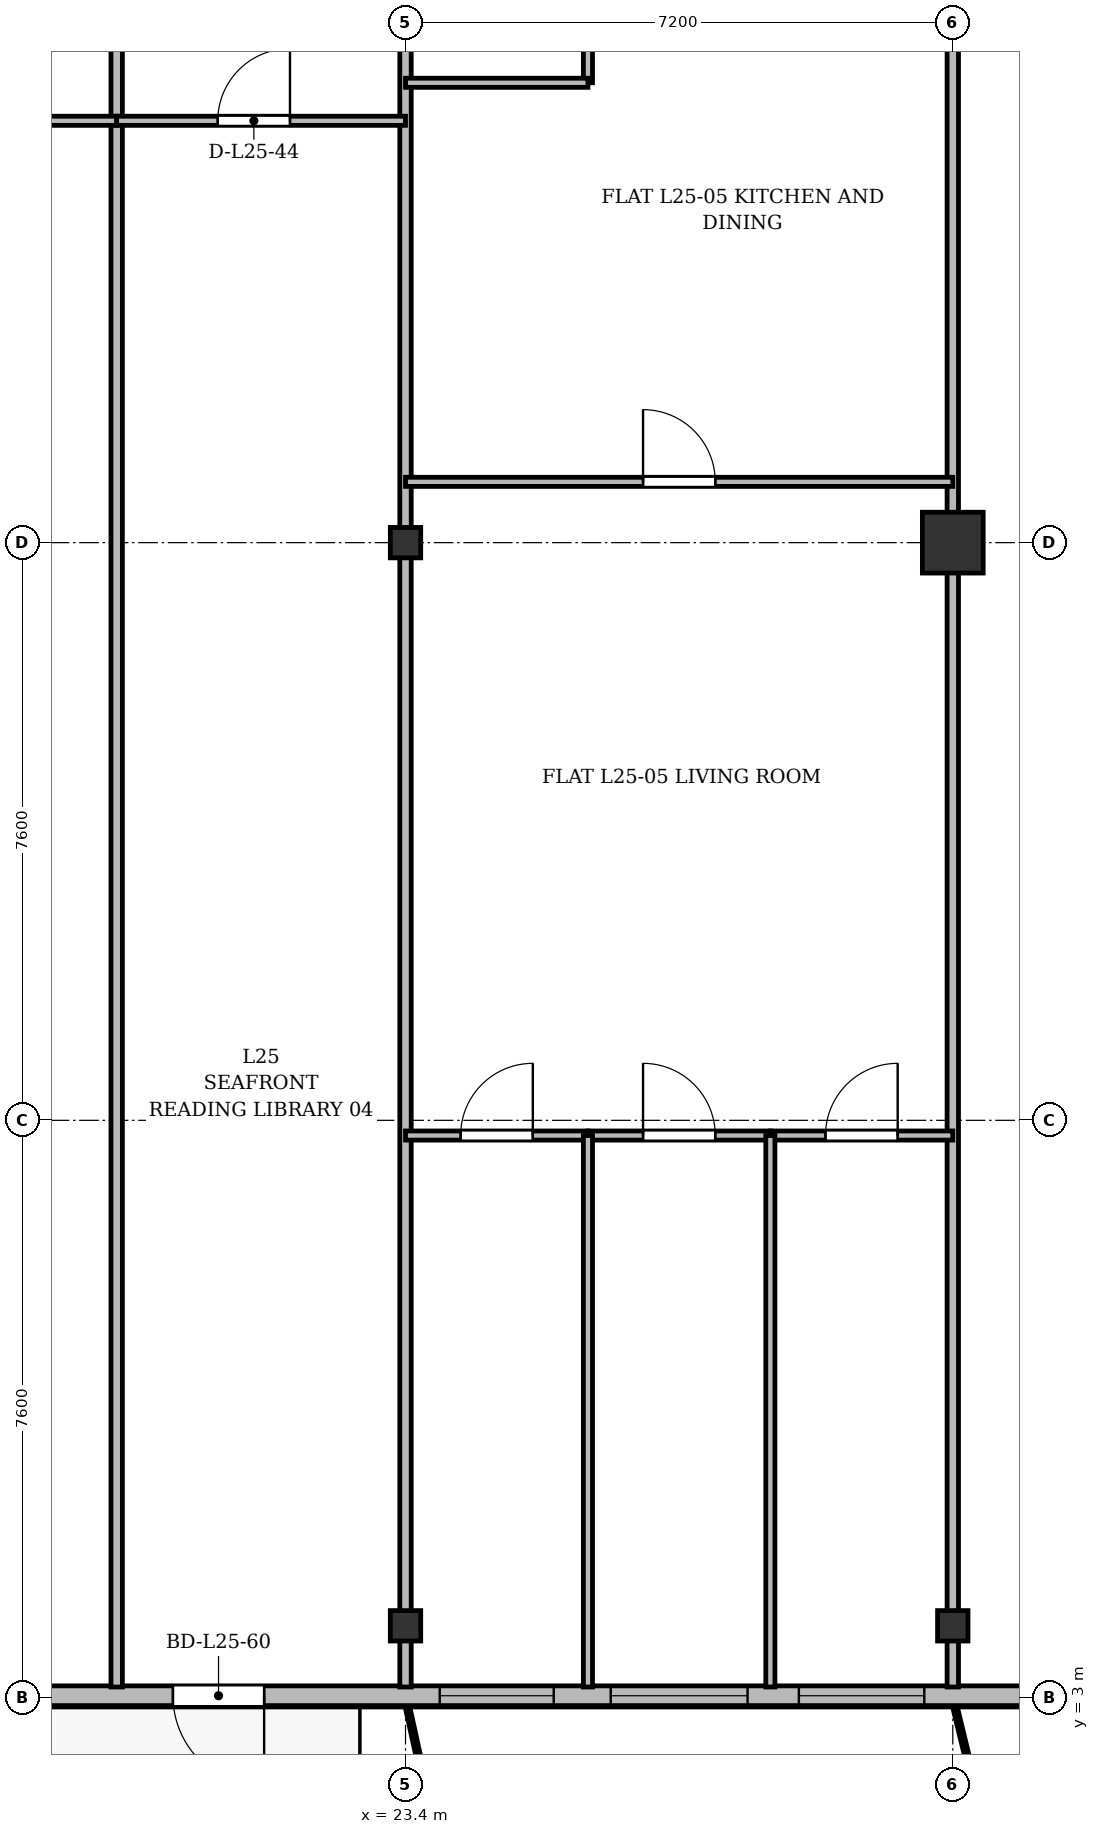
"""IFC4 building model, lengths in metres.
Left out: names, types, materials, properties, quantities, classifications, styles, units other than length and angle.
Written with IfcOpenShell. Run it as: python <this file> out.ifc"""

import sys

from ifc_helpers import new_model, si_unit, direction, frame, frame_2d, origin, origin_2d, place, context, subcontext, project, spatial, rectangle, i_section, extrude, source, transform, mapped, element, fill, save


model = new_model("IFC4")
c1 = context("Model", 3, precision=1e-05, world=origin(), true_north=direction((0.0, 1.0)))
c2 = subcontext(c1, "Body", "Model", "MODEL_VIEW")
j1 = project(units=[si_unit("LENGTHUNIT", "METRE"), si_unit("PLANEANGLEUNIT", "RADIAN")], contexts=[c1])
p1 = place(None, origin())
s1 = spatial("IfcSite", under=j1, at=p1, CompositionType="ELEMENT")
p2 = place(p1, origin())
s2 = spatial("IfcBuilding", under=s1, at=p2, CompositionType="ELEMENT")
p3 = place(p2, frame((0.0, 0.0, 99.7)))
s3 = spatial("IfcBuildingStorey", under=s2, at=p3, CompositionType="ELEMENT", Elevation=99.7)
m1 = source(origin(), c2, "Body", "SweptSolid", [
    extrude(i_section(OverallWidth=0.4, OverallDepth=0.4, WebThickness=0.022, FlangeThickness=0.035, at=origin_2d()), origin(), (0.0, 0.0, 1.0), 3.6),
])
for number, where, z_axis, x_axis in (
    (1, (23.4, 3.95, 0.0), (0.0, 0.0, 1.0), (1.0, 0.0, 0.0)),
    (2, (23.4, 18.2, 0.0), (0.0, 0.0, 1.0), (1.0, 0.0, 0.0)),
    (3, (30.6, 3.95, 0.0), (0.0, 0.0, 1.0), (1.0, 0.0, 0.0)),
):
    element("IfcColumn", number, at=place(p3, frame(where, z_axis=z_axis, x_axis=x_axis)), inside=s3, PredefinedType="COLUMN", context=c2, shape_type="MappedRepresentation", body=[
        mapped(m1, transform((0.0, 0.0, 0.0), x_axis=(1.0, 0.0, 0.0), y_axis=(0.0, 1.0, 0.0), z_axis=(0.0, 0.0, 1.0), scale=1.0)),
    ])
m2 = source(origin(), c2, "Body", "SweptSolid", [
    extrude(rectangle(XDim=0.8, YDim=0.8, at=origin_2d()), origin(), (0.0, 0.0, 1.0), 3.6),
])
p4 = place(p3, frame((30.6, 18.2, 0.0), z_axis=(0.0, 0.0, 1.0), x_axis=(1.0, 0.0, 0.0)))
e4 = element("IfcColumn", 4, at=p4, inside=s3, PredefinedType="COLUMN", context=c2, shape_type="MappedRepresentation", body=[
    mapped(m2, transform((0.0, 0.0, 0.0), x_axis=(1.0, 0.0, 0.0), y_axis=(0.0, 1.0, 0.0), z_axis=(0.0, 0.0, 1.0), scale=1.0)),
])
p5 = place(p3, frame((66.9, 3.03, 0.0), z_axis=(0.0, 0.0, 1.0), x_axis=(-1.0, 0.0, 0.0)))
e5 = element("IfcWall", 5, at=p5, inside=s3, PredefinedType="SOLIDWALL", context=c2, shape_type="SweptSolid", body=[
    extrude(rectangle(XDim=59.4, YDim=0.26, at=frame_2d((29.7, 0.0))), origin(), (0.0, 0.0, 1.0), 3.34),
])
p6 = place(p5, frame((1.9, 0.0, 0.9)))
e6 = element("IfcOpeningElement", 6, at=p6, cuts=e5, PredefinedType="OPENING", context=c2, shape_type="SweptSolid", body=[
    extrude(rectangle(XDim=2.2, YDim=1.8, at=frame_2d((1.1, 0.9))), frame((0.0, 0.14, 0.0), z_axis=(0.0, -1.0, 0.0), x_axis=(1.0, 0.0, 0.0)), (0.0, 0.0, 1.0), 0.28),
])
p7 = place(p5, frame((5.65, 0.0, 0.9)))
e7 = element("IfcOpeningElement", 7, at=p7, cuts=e5, PredefinedType="OPENING", context=c2, shape_type="SweptSolid", body=[
    extrude(rectangle(XDim=1.5, YDim=1.75, at=frame_2d((0.75, 0.875))), frame((0.0, 0.14, 0.0), z_axis=(0.0, -1.0, 0.0), x_axis=(1.0, 0.0, 0.0)), (0.0, 0.0, 1.0), 0.28),
])
p8 = place(p5, frame((8.4, 0.0, 0.9)))
e8 = element("IfcOpeningElement", 8, at=p8, cuts=e5, PredefinedType="OPENING", context=c2, shape_type="SweptSolid", body=[
    extrude(rectangle(XDim=2.0, YDim=1.95, at=frame_2d((1.0, 0.975))), frame((0.0, 0.14, 0.0), z_axis=(0.0, -1.0, 0.0), x_axis=(1.0, 0.0, 0.0)), (0.0, 0.0, 1.0), 0.28),
])
p9 = place(p5, frame((11.175, 0.0, 0.9)))
e9 = element("IfcOpeningElement", 9, at=p9, cuts=e5, PredefinedType="OPENING", context=c2, shape_type="SweptSolid", body=[
    extrude(rectangle(XDim=1.65, YDim=1.85, at=frame_2d((0.825, 0.925))), frame((0.0, 0.14, 0.0), z_axis=(0.0, -1.0, 0.0), x_axis=(1.0, 0.0, 0.0)), (0.0, 0.0, 1.0), 0.28),
])
p10 = place(p5, frame((13.7, 0.0, 0.9)))
e10 = element("IfcOpeningElement", 10, at=p10, cuts=e5, PredefinedType="OPENING", context=c2, shape_type="SweptSolid", body=[
    extrude(rectangle(XDim=1.8, YDim=1.8, at=frame_2d((0.9, 0.9))), frame((0.0, 0.14, 0.0), z_axis=(0.0, -1.0, 0.0), x_axis=(1.0, 0.0, 0.0)), (0.0, 0.0, 1.0), 0.28),
])
p11 = place(p5, frame((16.5, 0.0, 0.9)))
e11 = element("IfcOpeningElement", 11, at=p11, cuts=e5, PredefinedType="OPENING", context=c2, shape_type="SweptSolid", body=[
    extrude(rectangle(XDim=2.2, YDim=1.8, at=frame_2d((1.1, 0.9))), frame((0.0, 0.14, 0.0), z_axis=(0.0, -1.0, 0.0), x_axis=(1.0, 0.0, 0.0)), (0.0, 0.0, 1.0), 0.28),
])
p12 = place(p5, frame((20.227, 0.0, 0.0)))
e12 = element("IfcOpeningElement", 12, at=p12, cuts=e5, PredefinedType="OPENING", context=c2, shape_type="SweptSolid", body=[
    extrude(rectangle(XDim=1.2, YDim=2.2, at=frame_2d((0.6, 1.1))), frame((0.0, 0.14, 0.0), z_axis=(0.0, -1.0, 0.0), x_axis=(1.0, 0.0, 0.0)), (0.0, 0.0, 1.0), 0.28),
])
p13 = place(p5, frame((28.7, 0.0, 0.9)))
e13 = element("IfcOpeningElement", 13, at=p13, cuts=e5, PredefinedType="OPENING", context=c2, shape_type="SweptSolid", body=[
    extrude(rectangle(XDim=2.0, YDim=1.95, at=frame_2d((1.0, 0.975))), frame((0.0, 0.14, 0.0), z_axis=(0.0, -1.0, 0.0), x_axis=(1.0, 0.0, 0.0)), (0.0, 0.0, 1.0), 0.28),
])
p14 = place(p5, frame((36.675, 0.0, 0.9)))
e14 = element("IfcOpeningElement", 14, at=p14, cuts=e5, PredefinedType="OPENING", context=c2, shape_type="SweptSolid", body=[
    extrude(rectangle(XDim=1.65, YDim=1.85, at=frame_2d((0.825, 0.925))), frame((0.0, 0.14, 0.0), z_axis=(0.0, -1.0, 0.0), x_axis=(1.0, 0.0, 0.0)), (0.0, 0.0, 1.0), 0.28),
])
p15 = place(p5, frame((39.0, 0.0, 0.9)))
e15 = element("IfcOpeningElement", 15, at=p15, cuts=e5, PredefinedType="OPENING", context=c2, shape_type="SweptSolid", body=[
    extrude(rectangle(XDim=1.8, YDim=1.8, at=frame_2d((0.9, 0.9))), frame((0.0, 0.14, 0.0), z_axis=(0.0, -1.0, 0.0), x_axis=(1.0, 0.0, 0.0)), (0.0, 0.0, 1.0), 0.28),
])
p16 = place(p5, frame((41.55, 0.0, 0.9)))
e16 = element("IfcOpeningElement", 16, at=p16, cuts=e5, PredefinedType="OPENING", context=c2, shape_type="SweptSolid", body=[
    extrude(rectangle(XDim=1.5, YDim=1.75, at=frame_2d((0.75, 0.875))), frame((0.0, 0.14, 0.0), z_axis=(0.0, -1.0, 0.0), x_axis=(1.0, 0.0, 0.0)), (0.0, 0.0, 1.0), 0.28),
])
p17 = place(p5, frame((45.36, 0.0, 0.0)))
e17 = element("IfcOpeningElement", 17, at=p17, cuts=e5, PredefinedType="OPENING", context=c2, shape_type="SweptSolid", body=[
    extrude(rectangle(XDim=1.2, YDim=2.2, at=frame_2d((0.6, 1.1))), frame((0.0, 0.14, 0.0), z_axis=(0.0, -1.0, 0.0), x_axis=(1.0, 0.0, 0.0)), (0.0, 0.0, 1.0), 0.28),
])
p18 = place(p5, frame((48.3, 0.0, 0.9)))
e18 = element("IfcOpeningElement", 18, at=p18, cuts=e5, PredefinedType="OPENING", context=c2, shape_type="SweptSolid", body=[
    extrude(rectangle(XDim=2.0, YDim=1.95, at=frame_2d((1.0, 0.975))), frame((0.0, 0.14, 0.0), z_axis=(0.0, -1.0, 0.0), x_axis=(1.0, 0.0, 0.0)), (0.0, 0.0, 1.0), 0.28),
])
p19 = place(p5, frame((52.175, 0.0, 0.9)))
e19 = element("IfcOpeningElement", 19, at=p19, cuts=e5, PredefinedType="OPENING", context=c2, shape_type="SweptSolid", body=[
    extrude(rectangle(XDim=1.65, YDim=1.85, at=frame_2d((0.825, 0.925))), frame((0.0, 0.14, 0.0), z_axis=(0.0, -1.0, 0.0), x_axis=(1.0, 0.0, 0.0)), (0.0, 0.0, 1.0), 0.28),
])
p20 = place(p5, frame((55.5, 0.0, 0.9)))
e20 = element("IfcOpeningElement", 20, at=p20, cuts=e5, PredefinedType="OPENING", context=c2, shape_type="SweptSolid", body=[
    extrude(rectangle(XDim=1.8, YDim=1.8, at=frame_2d((0.9, 0.9))), frame((0.0, 0.14, 0.0), z_axis=(0.0, -1.0, 0.0), x_axis=(1.0, 0.0, 0.0)), (0.0, 0.0, 1.0), 0.28),
])
p21 = place(p3, frame((19.6, 3.145, 0.0), z_axis=(0.0, 0.0, 1.0), x_axis=(0.0, 1.0, 0.0)))
e21 = element("IfcWall", 21, at=p21, inside=s3, PredefinedType="PARTITIONING", context=c2, shape_type="SweptSolid", body=[
    extrude(rectangle(XDim=24.455, YDim=0.15, at=frame_2d((12.228, 0.0))), origin(), (0.0, 0.0, 1.0), 2.752),
])
for number, where, z_axis, x_axis in (
    (22, (23.4, 3.145, 0.0), (0.0, 0.0, 1.0), (0.0, 1.0, 0.0)),
    (23, (30.6, 3.145, 0.0), (0.0, 0.0, 1.0), (0.0, 1.0, 0.0)),
):
    element("IfcWall", number, at=place(p3, frame(where, z_axis=z_axis, x_axis=x_axis)), inside=s3, PredefinedType="PARTITIONING", context=c2, shape_type="SweptSolid", body=[
        extrude(rectangle(XDim=24.455, YDim=0.15, at=frame_2d((12.228, 0.0))), origin(), (0.0, 0.0, 1.0), 2.84),
    ])
p22 = place(p3, frame((15.6, 23.75, 0.0), z_axis=(0.0, 0.0, 1.0), x_axis=(1.0, 0.0, 0.0)))
e24 = element("IfcWall", 24, at=p22, inside=s3, PredefinedType="PARTITIONING", context=c2, shape_type="SweptSolid", body=[
    extrude(rectangle(XDim=4.0, YDim=0.12, at=frame_2d((2.0, 0.0))), origin(), (0.0, 0.0, 1.0), 2.84),
])
p23 = place(p22, frame((1.525, 0.0, 0.0)))
e25 = element("IfcOpeningElement", 25, at=p23, cuts=e24, PredefinedType="OPENING", context=c2, shape_type="SweptSolid", body=[
    extrude(rectangle(XDim=0.95, YDim=2.15, at=frame_2d((0.475, 1.075))), frame((0.0, 0.07, 0.0), z_axis=(0.0, -1.0, 0.0), x_axis=(1.0, 0.0, 0.0)), (0.0, 0.0, 1.0), 0.14),
])
p24 = place(p3, frame((19.6, 23.75, 0.0), z_axis=(0.0, 0.0, 1.0), x_axis=(1.0, 0.0, 0.0)))
e26 = element("IfcWall", 26, at=p24, inside=s3, PredefinedType="PARTITIONING", context=c2, shape_type="SweptSolid", body=[
    extrude(rectangle(XDim=3.8, YDim=0.12, at=frame_2d((1.9, 0.0))), origin(), (0.0, 0.0, 1.0), 2.84),
])
p25 = place(p24, frame((1.33, 0.0, 0.0)))
e27 = element("IfcOpeningElement", 27, at=p25, cuts=e26, PredefinedType="OPENING", context=c2, shape_type="SweptSolid", body=[
    extrude(rectangle(XDim=0.95, YDim=2.15, at=frame_2d((0.475, 1.075))), frame((0.0, 0.07, 0.0), z_axis=(0.0, -1.0, 0.0), x_axis=(1.0, 0.0, 0.0)), (0.0, 0.0, 1.0), 0.14),
])
p26 = place(p3, frame((23.4, 19.0, 0.0), z_axis=(0.0, 0.0, 1.0), x_axis=(1.0, 0.0, 0.0)))
e28 = element("IfcWall", 28, at=p26, inside=s3, PredefinedType="PARTITIONING", context=c2, shape_type="SweptSolid", body=[
    extrude(rectangle(XDim=7.2, YDim=0.12, at=frame_2d((3.6, 0.0))), origin(), (0.0, 0.0, 1.0), 2.84),
])
p27 = place(p26, frame((3.125, 0.0, 0.0)))
e29 = element("IfcOpeningElement", 29, at=p27, cuts=e28, PredefinedType="OPENING", context=c2, shape_type="SweptSolid", body=[
    extrude(rectangle(XDim=0.95, YDim=2.15, at=frame_2d((0.475, 1.075))), frame((0.0, 0.07, 0.0), z_axis=(0.0, -1.0, 0.0), x_axis=(1.0, 0.0, 0.0)), (0.0, 0.0, 1.0), 0.14),
])
p28 = place(p3, frame((25.8, 24.25, 0.0), z_axis=(0.0, 0.0, 1.0), x_axis=(0.0, 1.0, 0.0)))
e30 = element("IfcWall", 30, at=p28, inside=s3, PredefinedType="PARTITIONING", context=c2, shape_type="SweptSolid", body=[
    extrude(rectangle(XDim=3.35, YDim=0.12, at=frame_2d((1.675, 0.0))), origin(), (0.0, 0.0, 1.0), 2.99),
])
p29 = place(p28, frame((0.8, 0.0, 0.0)))
e31 = element("IfcOpeningElement", 31, at=p29, cuts=e30, PredefinedType="OPENING", context=c2, shape_type="SweptSolid", body=[
    extrude(rectangle(XDim=0.85, YDim=2.1, at=frame_2d((0.425, 1.05))), frame((0.0, 0.07, 0.0), z_axis=(0.0, -1.0, 0.0), x_axis=(1.0, 0.0, 0.0)), (0.0, 0.0, 1.0), 0.14),
])
p30 = place(p3, frame((23.4, 24.25, 0.0), z_axis=(0.0, 0.0, 1.0), x_axis=(1.0, 0.0, 0.0)))
e32 = element("IfcWall", 32, at=p30, inside=s3, PredefinedType="PARTITIONING", context=c2, shape_type="SweptSolid", body=[
    extrude(rectangle(XDim=2.4, YDim=0.12, at=frame_2d((1.2, 0.0))), origin(), (0.0, 0.0, 1.0), 2.84),
])
p31 = place(p3, frame((23.4, 10.4, 0.0), z_axis=(0.0, 0.0, 1.0), x_axis=(1.0, 0.0, 0.0)))
e33 = element("IfcWall", 33, at=p31, inside=s3, PredefinedType="PARTITIONING", context=c2, shape_type="SweptSolid", body=[
    extrude(rectangle(XDim=2.4, YDim=0.12, at=frame_2d((1.2, 0.0))), origin(), (0.0, 0.0, 1.0), 2.84),
])
p32 = place(p31, frame((0.725, 0.0, 0.0)))
e34 = element("IfcOpeningElement", 34, at=p32, cuts=e33, PredefinedType="OPENING", context=c2, shape_type="SweptSolid", body=[
    extrude(rectangle(XDim=0.95, YDim=2.15, at=frame_2d((0.475, 1.075))), frame((0.0, 0.07, 0.0), z_axis=(0.0, -1.0, 0.0), x_axis=(1.0, 0.0, 0.0)), (0.0, 0.0, 1.0), 0.14),
])
p33 = place(p3, frame((25.8, 10.4, 0.0), z_axis=(0.0, 0.0, 1.0), x_axis=(1.0, 0.0, 0.0)))
e35 = element("IfcWall", 35, at=p33, inside=s3, PredefinedType="PARTITIONING", context=c2, shape_type="SweptSolid", body=[
    extrude(rectangle(XDim=2.4, YDim=0.12, at=frame_2d((1.2, 0.0))), origin(), (0.0, 0.0, 1.0), 3.34),
])
p34 = place(p33, frame((0.725, 0.0, 0.0)))
e36 = element("IfcOpeningElement", 36, at=p34, cuts=e35, PredefinedType="OPENING", context=c2, shape_type="SweptSolid", body=[
    extrude(rectangle(XDim=0.95, YDim=2.15, at=frame_2d((0.475, 1.075))), frame((0.0, 0.07, 0.0), z_axis=(0.0, -1.0, 0.0), x_axis=(1.0, 0.0, 0.0)), (0.0, 0.0, 1.0), 0.14),
])
p35 = place(p3, frame((25.8, 3.145, 0.0), z_axis=(0.0, 0.0, 1.0), x_axis=(0.0, 1.0, 0.0)))
e37 = element("IfcWall", 37, at=p35, inside=s3, PredefinedType="PARTITIONING", context=c2, shape_type="SweptSolid", body=[
    extrude(rectangle(XDim=7.255, YDim=0.12, at=frame_2d((3.627, 0.0))), origin(), (0.0, 0.0, 1.0), 2.752),
])
p36 = place(p3, frame((28.2, 10.4, 0.0), z_axis=(0.0, 0.0, 1.0), x_axis=(1.0, 0.0, 0.0)))
e38 = element("IfcWall", 38, at=p36, inside=s3, PredefinedType="PARTITIONING", context=c2, shape_type="SweptSolid", body=[
    extrude(rectangle(XDim=2.4, YDim=0.12, at=frame_2d((1.2, 0.0))), origin(), (0.0, 0.0, 1.0), 2.84),
])
p37 = place(p36, frame((0.725, 0.0, 0.0)))
e39 = element("IfcOpeningElement", 39, at=p37, cuts=e38, PredefinedType="OPENING", context=c2, shape_type="SweptSolid", body=[
    extrude(rectangle(XDim=0.95, YDim=2.15, at=frame_2d((0.475, 1.075))), frame((0.0, 0.07, 0.0), z_axis=(0.0, -1.0, 0.0), x_axis=(1.0, 0.0, 0.0)), (0.0, 0.0, 1.0), 0.14),
])
p38 = place(p3, frame((28.2, 3.145, 0.0), z_axis=(0.0, 0.0, 1.0), x_axis=(0.0, 1.0, 0.0)))
e40 = element("IfcWall", 40, at=p38, inside=s3, PredefinedType="PARTITIONING", context=c2, shape_type="SweptSolid", body=[
    extrude(rectangle(XDim=7.255, YDim=0.12, at=frame_2d((3.627, 0.0))), origin(), (0.0, 0.0, 1.0), 2.752),
])
m3 = source(origin(), c2, "Body", "SweptSolid", [
    extrude(rectangle(XDim=1.65, YDim=1.85, at=frame_2d((0.825, 0.925))), frame((0.0, 0.03, 0.0), z_axis=(0.0, -1.0, 0.0), x_axis=(1.0, 0.0, 0.0)), (0.0, 0.0, 1.0), 0.06),
])
p39 = place(p14, origin())
e41 = element("IfcWindow", 41, at=p39, inside=s3, PartitioningType="SINGLE_PANEL", PredefinedType="WINDOW", context=c2, shape_type="MappedRepresentation", body=[
    mapped(m3, transform((0.0, 0.0, 0.0), x_axis=(1.0, 0.0, 0.0), y_axis=(0.0, 1.0, 0.0), z_axis=(0.0, 0.0, 1.0), scale=1.0)),
])
fill(e14, e41)
m4 = source(origin(), c2, "Body", "SweptSolid", [
    extrude(rectangle(XDim=1.8, YDim=1.8, at=frame_2d((0.9, 0.9))), frame((0.0, 0.03, 0.0), z_axis=(0.0, -1.0, 0.0), x_axis=(1.0, 0.0, 0.0)), (0.0, 0.0, 1.0), 0.06),
])
p40 = place(p15, origin())
e42 = element("IfcWindow", 42, at=p40, inside=s3, PartitioningType="SINGLE_PANEL", PredefinedType="WINDOW", context=c2, shape_type="MappedRepresentation", body=[
    mapped(m4, transform((0.0, 0.0, 0.0), x_axis=(1.0, 0.0, 0.0), y_axis=(0.0, 1.0, 0.0), z_axis=(0.0, 0.0, 1.0), scale=1.0)),
])
fill(e15, e42)
m5 = source(origin(), c2, "Body", "SweptSolid", [
    extrude(rectangle(XDim=1.5, YDim=1.75, at=frame_2d((0.75, 0.875))), frame((0.0, 0.03, 0.0), z_axis=(0.0, -1.0, 0.0), x_axis=(1.0, 0.0, 0.0)), (0.0, 0.0, 1.0), 0.06),
])
p41 = place(p16, origin())
e43 = element("IfcWindow", 43, at=p41, inside=s3, PartitioningType="SINGLE_PANEL", PredefinedType="WINDOW", context=c2, shape_type="MappedRepresentation", body=[
    mapped(m5, transform((0.0, 0.0, 0.0), x_axis=(1.0, 0.0, 0.0), y_axis=(0.0, 1.0, 0.0), z_axis=(0.0, 0.0, 1.0), scale=1.0)),
])
fill(e16, e43)
m6 = source(origin(), c2, "Body", "SweptSolid", [
    extrude(rectangle(XDim=1.2, YDim=2.2, at=frame_2d((0.6, 1.1))), frame((0.0, 0.025, 0.0), z_axis=(0.0, -1.0, 0.0), x_axis=(1.0, 0.0, 0.0)), (0.0, 0.0, 1.0), 0.05),
])
p42 = place(p17, origin())
e44 = element("IfcDoor", 44, at=p42, inside=s3, OperationType="SINGLE_SWING_LEFT", PredefinedType="DOOR", context=c2, shape_type="MappedRepresentation", body=[
    mapped(m6, transform((0.0, 0.0, 0.0), x_axis=(1.0, 0.0, 0.0), y_axis=(0.0, 1.0, 0.0), z_axis=(0.0, 0.0, 1.0), scale=1.0)),
])
fill(e17, e44)
m7 = source(origin(), c2, "Body", "SweptSolid", [
    extrude(rectangle(XDim=0.95, YDim=2.15, at=frame_2d((0.475, 1.075))), frame((0.0, 0.025, 0.0), z_axis=(0.0, -1.0, 0.0), x_axis=(1.0, 0.0, 0.0)), (0.0, 0.0, 1.0), 0.05),
])
p43 = place(p25, origin())
e45 = element("IfcDoor", 45, at=p43, inside=s3, OperationType="SINGLE_SWING_RIGHT", PredefinedType="DOOR", context=c2, shape_type="MappedRepresentation", body=[
    mapped(m7, transform((0.0, 0.0, 0.0), x_axis=(1.0, 0.0, 0.0), y_axis=(0.0, 1.0, 0.0), z_axis=(0.0, 0.0, 1.0), scale=1.0)),
])
fill(e27, e45)
p44 = place(p27, origin())
e46 = element("IfcDoor", 46, at=p44, inside=s3, OperationType="SINGLE_SWING_LEFT", PredefinedType="DOOR", context=c2, shape_type="MappedRepresentation", body=[
    mapped(m7, transform((0.0, 0.0, 0.0), x_axis=(1.0, 0.0, 0.0), y_axis=(0.0, 1.0, 0.0), z_axis=(0.0, 0.0, 1.0), scale=1.0)),
])
fill(e29, e46)
p45 = place(p32, origin())
e47 = element("IfcDoor", 47, at=p45, inside=s3, OperationType="SINGLE_SWING_RIGHT", PredefinedType="DOOR", context=c2, shape_type="MappedRepresentation", body=[
    mapped(m7, transform((0.0, 0.0, 0.0), x_axis=(1.0, 0.0, 0.0), y_axis=(0.0, 1.0, 0.0), z_axis=(0.0, 0.0, 1.0), scale=1.0)),
])
fill(e34, e47)
p46 = place(p34, origin())
e48 = element("IfcDoor", 48, at=p46, inside=s3, OperationType="SINGLE_SWING_LEFT", PredefinedType="DOOR", context=c2, shape_type="MappedRepresentation", body=[
    mapped(m7, transform((0.0, 0.0, 0.0), x_axis=(1.0, 0.0, 0.0), y_axis=(0.0, 1.0, 0.0), z_axis=(0.0, 0.0, 1.0), scale=1.0)),
])
fill(e36, e48)
p47 = place(p37, origin())
e49 = element("IfcDoor", 49, at=p47, inside=s3, OperationType="SINGLE_SWING_RIGHT", PredefinedType="DOOR", context=c2, shape_type="MappedRepresentation", body=[
    mapped(m7, transform((0.0, 0.0, 0.0), x_axis=(1.0, 0.0, 0.0), y_axis=(0.0, 1.0, 0.0), z_axis=(0.0, 0.0, 1.0), scale=1.0)),
])
fill(e39, e49)
save(model, sys.argv[1])
